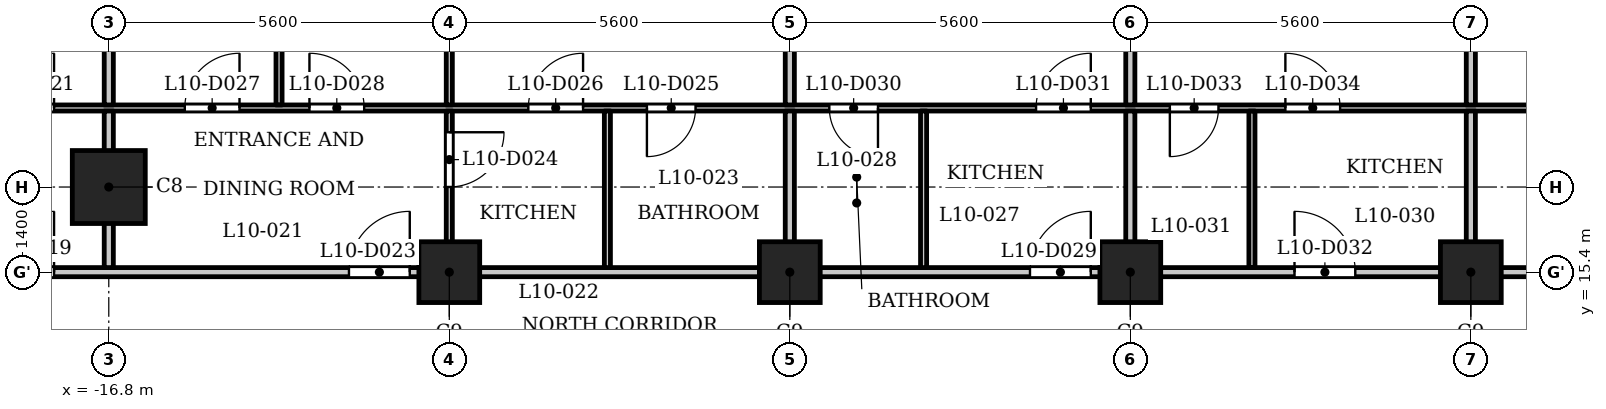
"""IFC4 building model, lengths in metres.
Left out: names, types, materials, properties, quantities, classifications, styles, units other than length and angle.
Written with IfcOpenShell. Run it as: python <this file> out.ifc"""

import sys

from ifc_helpers import new_model, si_unit, direction, frame, frame_2d, origin, origin_2d, place, context, subcontext, project, spatial, rectangle, extrude, element, fill, save


model = new_model("IFC4")
c1 = context("Model", 3, precision=1e-05, world=origin(), true_north=direction((0.0, 1.0)))
c2 = subcontext(c1, "Body", "Model", "MODEL_VIEW")
j1 = project(units=[si_unit("LENGTHUNIT", "METRE"), si_unit("PLANEANGLEUNIT", "RADIAN")], contexts=[c1])
p1 = place(None, origin())
s1 = spatial("IfcSite", under=j1, at=p1, CompositionType="ELEMENT")
p2 = place(p1, origin())
s2 = spatial("IfcBuilding", under=s1, at=p2, CompositionType="ELEMENT")
p3 = place(p2, frame((0.0, 0.0, 44.5)))
s3 = spatial("IfcBuildingStorey", under=s2, at=p3, CompositionType="ELEMENT", Elevation=44.5)
p4 = place(p3, frame((-16.8, 16.8, 0.0), z_axis=(0.0, 0.0, 1.0), x_axis=(1.0, 0.0, 0.0)))
e1 = element("IfcColumn", 1, at=p4, inside=s3, PredefinedType="COLUMN", context=c2, shape_type="SweptSolid", body=[
    extrude(rectangle(XDim=1.2, YDim=1.2, at=origin_2d()), origin(), (0.0, 0.0, 1.0), 3.5),
])
for number, where, z_axis, x_axis in (
    (2, (-11.2, 15.4, 0.0), (0.0, 0.0, 1.0), (1.0, 0.0, 0.0)),
    (3, (-5.6, 15.4, 0.0), (0.0, 0.0, 1.0), (1.0, 0.0, 0.0)),
    (4, (0.0, 15.4, 0.0), (0.0, 0.0, 1.0), (1.0, 0.0, 0.0)),
    (5, (5.6, 15.4, 0.0), (0.0, 0.0, 1.0), (1.0, 0.0, 0.0)),
):
    element("IfcColumn", number, at=place(p3, frame(where, z_axis=z_axis, x_axis=x_axis)), inside=s3, PredefinedType="COLUMN", context=c2, shape_type="SweptSolid", body=[
        extrude(rectangle(XDim=1.0, YDim=1.0, at=origin_2d()), origin(), (0.0, 0.0, 1.0), 3.5),
    ])
p5 = place(p3, frame((-27.484, 15.4, 0.0), z_axis=(0.0, 0.0, 1.0), x_axis=(1.0, 0.0, 0.0)))
e6 = element("IfcWall", 6, at=p5, inside=s3, PredefinedType="PARTITIONING", context=c2, shape_type="SweptSolid", body=[
    extrude(rectangle(XDim=54.968, YDim=0.15, at=frame_2d((27.484, 0.0))), origin(), (0.0, 0.0, 1.0), 3.2),
])
p6 = place(p5, frame((8.784, 0.0, 0.0)))
e7 = element("IfcOpeningElement", 7, at=p6, cuts=e6, PredefinedType="OPENING", context=c2, shape_type="SweptSolid", body=[
    extrude(rectangle(XDim=1.0, YDim=2.1, at=frame_2d((0.5, 1.05))), frame((0.0, 0.085, 0.0), z_axis=(0.0, -1.0, 0.0), x_axis=(1.0, 0.0, 0.0)), (0.0, 0.0, 1.0), 0.17),
])
p7 = place(p5, frame((14.634, 0.0, 0.0)))
e8 = element("IfcOpeningElement", 8, at=p7, cuts=e6, PredefinedType="OPENING", context=c2, shape_type="SweptSolid", body=[
    extrude(rectangle(XDim=1.0, YDim=2.1, at=frame_2d((0.5, 1.05))), frame((0.0, 0.085, 0.0), z_axis=(0.0, -1.0, 0.0), x_axis=(1.0, 0.0, 0.0)), (0.0, 0.0, 1.0), 0.17),
])
p8 = place(p5, frame((25.834, 0.0, 0.0)))
e9 = element("IfcOpeningElement", 9, at=p8, cuts=e6, PredefinedType="OPENING", context=c2, shape_type="SweptSolid", body=[
    extrude(rectangle(XDim=1.0, YDim=2.1, at=frame_2d((0.5, 1.05))), frame((0.0, 0.085, 0.0), z_axis=(0.0, -1.0, 0.0), x_axis=(1.0, 0.0, 0.0)), (0.0, 0.0, 1.0), 0.17),
])
p9 = place(p5, frame((30.184, 0.0, 0.0)))
e10 = element("IfcOpeningElement", 10, at=p9, cuts=e6, PredefinedType="OPENING", context=c2, shape_type="SweptSolid", body=[
    extrude(rectangle(XDim=1.0, YDim=2.1, at=frame_2d((0.5, 1.05))), frame((0.0, 0.085, 0.0), z_axis=(0.0, -1.0, 0.0), x_axis=(1.0, 0.0, 0.0)), (0.0, 0.0, 1.0), 0.17),
])
p10 = place(p5, frame((37.034, 0.0, 0.0)))
e11 = element("IfcOpeningElement", 11, at=p10, cuts=e6, PredefinedType="OPENING", context=c2, shape_type="SweptSolid", body=[
    extrude(rectangle(XDim=1.0, YDim=2.1, at=frame_2d((0.5, 1.05))), frame((0.0, 0.085, 0.0), z_axis=(0.0, -1.0, 0.0), x_axis=(1.0, 0.0, 0.0)), (0.0, 0.0, 1.0), 0.17),
])
p11 = place(p5, frame((48.234, 0.0, 0.0)))
e12 = element("IfcOpeningElement", 12, at=p11, cuts=e6, PredefinedType="OPENING", context=c2, shape_type="SweptSolid", body=[
    extrude(rectangle(XDim=1.0, YDim=2.1, at=frame_2d((0.5, 1.05))), frame((0.0, 0.085, 0.0), z_axis=(0.0, -1.0, 0.0), x_axis=(1.0, 0.0, 0.0)), (0.0, 0.0, 1.0), 0.17),
])
p12 = place(p3, frame((-26.44, 18.1, 0.0), z_axis=(0.0, 0.0, 1.0), x_axis=(1.0, 0.0, 0.0)))
e13 = element("IfcWall", 13, at=p12, inside=s3, PredefinedType="PARTITIONING", context=c2, shape_type="SweptSolid", body=[
    extrude(rectangle(XDim=52.63, YDim=0.1, at=frame_2d((26.315, 0.0))), origin(), (0.0, 0.0, 1.0), 3.2),
])
p13 = place(p12, frame((2.626, 0.0, 0.0)))
e14 = element("IfcOpeningElement", 14, at=p13, cuts=e13, PredefinedType="OPENING", context=c2, shape_type="SweptSolid", body=[
    extrude(rectangle(XDim=0.8, YDim=2.1, at=frame_2d((0.4, 1.05))), frame((0.0, 0.06, 0.0), z_axis=(0.0, -1.0, 0.0), x_axis=(1.0, 0.0, 0.0)), (0.0, 0.0, 1.0), 0.12),
])
p14 = place(p12, frame((7.84, 0.0, 0.0)))
e15 = element("IfcOpeningElement", 15, at=p14, cuts=e13, PredefinedType="OPENING", context=c2, shape_type="SweptSolid", body=[
    extrude(rectangle(XDim=0.9, YDim=2.1, at=frame_2d((0.45, 1.05))), frame((0.0, 0.06, 0.0), z_axis=(0.0, -1.0, 0.0), x_axis=(1.0, 0.0, 0.0)), (0.0, 0.0, 1.0), 0.12),
])
p15 = place(p12, frame((18.49, 0.0, 0.0)))
e16 = element("IfcOpeningElement", 16, at=p15, cuts=e13, PredefinedType="OPENING", context=c2, shape_type="SweptSolid", body=[
    extrude(rectangle(XDim=0.8, YDim=2.1, at=frame_2d((0.4, 1.05))), frame((0.0, 0.06, 0.0), z_axis=(0.0, -1.0, 0.0), x_axis=(1.0, 0.0, 0.0)), (0.0, 0.0, 1.0), 0.12),
])
p16 = place(p12, frame((16.54, 0.0, 0.0)))
e17 = element("IfcOpeningElement", 17, at=p16, cuts=e13, PredefinedType="OPENING", context=c2, shape_type="SweptSolid", body=[
    extrude(rectangle(XDim=0.9, YDim=2.1, at=frame_2d((0.45, 1.05))), frame((0.0, 0.06, 0.0), z_axis=(0.0, -1.0, 0.0), x_axis=(1.0, 0.0, 0.0)), (0.0, 0.0, 1.0), 0.12),
])
p17 = place(p12, frame((10.89, 0.0, 0.0)))
e18 = element("IfcOpeningElement", 18, at=p17, cuts=e13, PredefinedType="OPENING", context=c2, shape_type="SweptSolid", body=[
    extrude(rectangle(XDim=0.9, YDim=2.1, at=frame_2d((0.45, 1.05))), frame((0.0, 0.06, 0.0), z_axis=(0.0, -1.0, 0.0), x_axis=(1.0, 0.0, 0.0)), (0.0, 0.0, 1.0), 0.12),
])
p18 = place(p12, frame((12.94, 0.0, 0.0)))
e19 = element("IfcOpeningElement", 19, at=p18, cuts=e13, PredefinedType="OPENING", context=c2, shape_type="SweptSolid", body=[
    extrude(rectangle(XDim=0.9, YDim=2.1, at=frame_2d((0.45, 1.05))), frame((0.0, 0.06, 0.0), z_axis=(0.0, -1.0, 0.0), x_axis=(1.0, 0.0, 0.0)), (0.0, 0.0, 1.0), 0.12),
])
p19 = place(p12, frame((21.49, 0.0, 0.0)))
e20 = element("IfcOpeningElement", 20, at=p19, cuts=e13, PredefinedType="OPENING", context=c2, shape_type="SweptSolid", body=[
    extrude(rectangle(XDim=0.8, YDim=2.1, at=frame_2d((0.4, 1.05))), frame((0.0, 0.06, 0.0), z_axis=(0.0, -1.0, 0.0), x_axis=(1.0, 0.0, 0.0)), (0.0, 0.0, 1.0), 0.12),
])
p20 = place(p12, frame((24.89, 0.0, 0.0)))
e21 = element("IfcOpeningElement", 21, at=p20, cuts=e13, PredefinedType="OPENING", context=c2, shape_type="SweptSolid", body=[
    extrude(rectangle(XDim=0.9, YDim=2.1, at=frame_2d((0.45, 1.05))), frame((0.0, 0.06, 0.0), z_axis=(0.0, -1.0, 0.0), x_axis=(1.0, 0.0, 0.0)), (0.0, 0.0, 1.0), 0.12),
])
p21 = place(p12, frame((27.09, 0.0, 0.0)))
e22 = element("IfcOpeningElement", 22, at=p21, cuts=e13, PredefinedType="OPENING", context=c2, shape_type="SweptSolid", body=[
    extrude(rectangle(XDim=0.8, YDim=2.1, at=frame_2d((0.4, 1.05))), frame((0.0, 0.06, 0.0), z_axis=(0.0, -1.0, 0.0), x_axis=(1.0, 0.0, 0.0)), (0.0, 0.0, 1.0), 0.12),
])
p22 = place(p12, frame((28.99, 0.0, 0.0)))
e23 = element("IfcOpeningElement", 23, at=p22, cuts=e13, PredefinedType="OPENING", context=c2, shape_type="SweptSolid", body=[
    extrude(rectangle(XDim=0.9, YDim=2.1, at=frame_2d((0.45, 1.05))), frame((0.0, 0.06, 0.0), z_axis=(0.0, -1.0, 0.0), x_axis=(1.0, 0.0, 0.0)), (0.0, 0.0, 1.0), 0.12),
])
p23 = place(p12, frame((41.69, 0.0, 0.0)))
e24 = element("IfcOpeningElement", 24, at=p23, cuts=e13, PredefinedType="OPENING", context=c2, shape_type="SweptSolid", body=[
    extrude(rectangle(XDim=0.8, YDim=2.1, at=frame_2d((0.4, 1.05))), frame((0.0, 0.06, 0.0), z_axis=(0.0, -1.0, 0.0), x_axis=(1.0, 0.0, 0.0)), (0.0, 0.0, 1.0), 0.12),
])
p24 = place(p12, frame((38.99, 0.0, 0.0)))
e25 = element("IfcOpeningElement", 25, at=p24, cuts=e13, PredefinedType="OPENING", context=c2, shape_type="SweptSolid", body=[
    extrude(rectangle(XDim=0.9, YDim=2.1, at=frame_2d((0.45, 1.05))), frame((0.0, 0.06, 0.0), z_axis=(0.0, -1.0, 0.0), x_axis=(1.0, 0.0, 0.0)), (0.0, 0.0, 1.0), 0.12),
])
p25 = place(p12, frame((33.29, 0.0, 0.0)))
e26 = element("IfcOpeningElement", 26, at=p25, cuts=e13, PredefinedType="OPENING", context=c2, shape_type="SweptSolid", body=[
    extrude(rectangle(XDim=0.9, YDim=2.1, at=frame_2d((0.45, 1.05))), frame((0.0, 0.06, 0.0), z_axis=(0.0, -1.0, 0.0), x_axis=(1.0, 0.0, 0.0)), (0.0, 0.0, 1.0), 0.12),
])
p26 = place(p12, frame((35.34, 0.0, 0.0)))
e27 = element("IfcOpeningElement", 27, at=p26, cuts=e13, PredefinedType="OPENING", context=c2, shape_type="SweptSolid", body=[
    extrude(rectangle(XDim=0.9, YDim=2.1, at=frame_2d((0.45, 1.05))), frame((0.0, 0.06, 0.0), z_axis=(0.0, -1.0, 0.0), x_axis=(1.0, 0.0, 0.0)), (0.0, 0.0, 1.0), 0.12),
])
p27 = place(p12, frame((50.74, 0.0, 0.0)))
e28 = element("IfcOpeningElement", 28, at=p27, cuts=e13, PredefinedType="OPENING", context=c2, shape_type="SweptSolid", body=[
    extrude(rectangle(XDim=0.8, YDim=2.1, at=frame_2d((0.4, 1.05))), frame((0.0, 0.06, 0.0), z_axis=(0.0, -1.0, 0.0), x_axis=(1.0, 0.0, 0.0)), (0.0, 0.0, 1.0), 0.12),
])
p28 = place(p12, frame((47.29, 0.0, 0.0)))
e29 = element("IfcOpeningElement", 29, at=p28, cuts=e13, PredefinedType="OPENING", context=c2, shape_type="SweptSolid", body=[
    extrude(rectangle(XDim=0.9, YDim=2.1, at=frame_2d((0.45, 1.05))), frame((0.0, 0.06, 0.0), z_axis=(0.0, -1.0, 0.0), x_axis=(1.0, 0.0, 0.0)), (0.0, 0.0, 1.0), 0.12),
])
p29 = place(p3, frame((-16.8, 15.475, 0.0), z_axis=(0.0, 0.0, 1.0), x_axis=(0.0, 1.0, 0.0)))
e30 = element("IfcWall", 30, at=p29, inside=s3, PredefinedType="PARTITIONING", context=c2, shape_type="SweptSolid", body=[
    extrude(rectangle(XDim=2.575, YDim=0.15, at=frame_2d((1.288, 0.0))), origin(), (0.0, 0.0, 1.0), 3.2),
])
p30 = place(p3, frame((-16.8, 18.15, 0.0), z_axis=(0.0, 0.0, 1.0), x_axis=(0.0, 1.0, 0.0)))
e31 = element("IfcWall", 31, at=p30, inside=s3, PredefinedType="PARTITIONING", context=c2, shape_type="SweptSolid", body=[
    extrude(rectangle(XDim=4.98, YDim=0.15, at=frame_2d((2.49, 0.0))), origin(), (0.0, 0.0, 1.0), 3.2),
])
p31 = place(p3, frame((-14.0, 18.15, 0.0), z_axis=(0.0, 0.0, 1.0), x_axis=(0.0, 1.0, 0.0)))
e32 = element("IfcWall", 32, at=p31, inside=s3, PredefinedType="PARTITIONING", context=c2, shape_type="SweptSolid", body=[
    extrude(rectangle(XDim=3.93, YDim=0.1, at=frame_2d((1.965, 0.0))), origin(), (0.0, 0.0, 1.0), 3.2),
])
p32 = place(p3, frame((-11.2, 15.475, 0.0), z_axis=(0.0, 0.0, 1.0), x_axis=(0.0, 1.0, 0.0)))
e33 = element("IfcWall", 33, at=p32, inside=s3, PredefinedType="PARTITIONING", context=c2, shape_type="SweptSolid", body=[
    extrude(rectangle(XDim=2.575, YDim=0.1, at=frame_2d((1.288, 0.0))), origin(), (0.0, 0.0, 1.0), 3.2),
])
p33 = place(p32, frame((1.326, 0.0, 0.0)))
e34 = element("IfcOpeningElement", 34, at=p33, cuts=e33, PredefinedType="OPENING", context=c2, shape_type="SweptSolid", body=[
    extrude(rectangle(XDim=0.9, YDim=2.1, at=frame_2d((0.45, 1.05))), frame((0.0, 0.06, 0.0), z_axis=(0.0, -1.0, 0.0), x_axis=(1.0, 0.0, 0.0)), (0.0, 0.0, 1.0), 0.12),
])
p34 = place(p3, frame((-11.2, 18.15, 0.0), z_axis=(0.0, 0.0, 1.0), x_axis=(0.0, 1.0, 0.0)))
e35 = element("IfcWall", 35, at=p34, inside=s3, PredefinedType="PARTITIONING", context=c2, shape_type="SweptSolid", body=[
    extrude(rectangle(XDim=4.98, YDim=0.1, at=frame_2d((2.49, 0.0))), origin(), (0.0, 0.0, 1.0), 3.2),
])
p35 = place(p3, frame((-8.6, 15.475, 0.0), z_axis=(0.0, 0.0, 1.0), x_axis=(0.0, 1.0, 0.0)))
e36 = element("IfcWall", 36, at=p35, inside=s3, PredefinedType="PARTITIONING", context=c2, shape_type="SweptSolid", body=[
    extrude(rectangle(XDim=2.575, YDim=0.1, at=frame_2d((1.288, 0.0))), origin(), (0.0, 0.0, 1.0), 3.2),
])
p36 = place(p3, frame((-5.6, 15.475, 0.0), z_axis=(0.0, 0.0, 1.0), x_axis=(0.0, 1.0, 0.0)))
e37 = element("IfcWall", 37, at=p36, inside=s3, PredefinedType="PARTITIONING", context=c2, shape_type="SweptSolid", body=[
    extrude(rectangle(XDim=2.575, YDim=0.15, at=frame_2d((1.288, 0.0))), origin(), (0.0, 0.0, 1.0), 3.2),
])
p37 = place(p3, frame((-5.6, 18.15, 0.0), z_axis=(0.0, 0.0, 1.0), x_axis=(0.0, 1.0, 0.0)))
e38 = element("IfcWall", 38, at=p37, inside=s3, PredefinedType="PARTITIONING", context=c2, shape_type="SweptSolid", body=[
    extrude(rectangle(XDim=4.98, YDim=0.15, at=frame_2d((2.49, 0.0))), origin(), (0.0, 0.0, 1.0), 3.2),
])
p38 = place(p3, frame((-3.4, 15.475, 0.0), z_axis=(0.0, 0.0, 1.0), x_axis=(0.0, 1.0, 0.0)))
e39 = element("IfcWall", 39, at=p38, inside=s3, PredefinedType="PARTITIONING", context=c2, shape_type="SweptSolid", body=[
    extrude(rectangle(XDim=2.575, YDim=0.1, at=frame_2d((1.288, 0.0))), origin(), (0.0, 0.0, 1.0), 3.2),
])
p39 = place(p3, frame((0.0, 15.475, 0.0), z_axis=(0.0, 0.0, 1.0), x_axis=(0.0, 1.0, 0.0)))
e40 = element("IfcWall", 40, at=p39, inside=s3, PredefinedType="PARTITIONING", context=c2, shape_type="SweptSolid", body=[
    extrude(rectangle(XDim=2.575, YDim=0.15, at=frame_2d((1.288, 0.0))), origin(), (0.0, 0.0, 1.0), 3.2),
])
p40 = place(p3, frame((0.0, 18.15, 0.0), z_axis=(0.0, 0.0, 1.0), x_axis=(0.0, 1.0, 0.0)))
e41 = element("IfcWall", 41, at=p40, inside=s3, PredefinedType="PARTITIONING", context=c2, shape_type="SweptSolid", body=[
    extrude(rectangle(XDim=4.98, YDim=0.15, at=frame_2d((2.49, 0.0))), origin(), (0.0, 0.0, 1.0), 3.2),
])
p41 = place(p3, frame((2.0, 15.475, 0.0), z_axis=(0.0, 0.0, 1.0), x_axis=(0.0, 1.0, 0.0)))
e42 = element("IfcWall", 42, at=p41, inside=s3, PredefinedType="PARTITIONING", context=c2, shape_type="SweptSolid", body=[
    extrude(rectangle(XDim=2.575, YDim=0.1, at=frame_2d((1.288, 0.0))), origin(), (0.0, 0.0, 1.0), 3.2),
])
p42 = place(p3, frame((5.6, 15.475, 0.0), z_axis=(0.0, 0.0, 1.0), x_axis=(0.0, 1.0, 0.0)))
e43 = element("IfcWall", 43, at=p42, inside=s3, PredefinedType="PARTITIONING", context=c2, shape_type="SweptSolid", body=[
    extrude(rectangle(XDim=2.575, YDim=0.15, at=frame_2d((1.288, 0.0))), origin(), (0.0, 0.0, 1.0), 3.2),
])
p43 = place(p3, frame((5.6, 18.15, 0.0), z_axis=(0.0, 0.0, 1.0), x_axis=(0.0, 1.0, 0.0)))
e44 = element("IfcWall", 44, at=p43, inside=s3, PredefinedType="PARTITIONING", context=c2, shape_type="SweptSolid", body=[
    extrude(rectangle(XDim=4.98, YDim=0.15, at=frame_2d((2.49, 0.0))), origin(), (0.0, 0.0, 1.0), 3.2),
])
p44 = place(p6, origin())
e45 = element("IfcDoor", 45, at=p44, inside=s3, OperationType="SINGLE_SWING_LEFT", PredefinedType="DOOR", context=c2, shape_type="SweptSolid", body=[
    extrude(rectangle(XDim=1.0, YDim=2.1, at=frame_2d((0.5, 1.05))), frame((0.0, 0.025, 0.0), z_axis=(0.0, -1.0, 0.0), x_axis=(1.0, 0.0, 0.0)), (0.0, 0.0, 1.0), 0.05),
])
fill(e7, e45)
p45 = place(p14, origin())
e46 = element("IfcDoor", 46, at=p45, inside=s3, OperationType="SINGLE_SWING_LEFT", PredefinedType="DOOR", context=c2, shape_type="SweptSolid", body=[
    extrude(rectangle(XDim=0.9, YDim=2.1, at=frame_2d((0.45, 1.05))), frame((0.0, 0.025, 0.0), z_axis=(0.0, -1.0, 0.0), x_axis=(1.0, 0.0, 0.0)), (0.0, 0.0, 1.0), 0.05),
])
fill(e15, e46)
p46 = place(p7, origin())
e47 = element("IfcDoor", 47, at=p46, inside=s3, OperationType="SINGLE_SWING_LEFT", PredefinedType="DOOR", context=c2, shape_type="SweptSolid", body=[
    extrude(rectangle(XDim=1.0, YDim=2.1, at=frame_2d((0.5, 1.05))), frame((0.0, 0.025, 0.0), z_axis=(0.0, -1.0, 0.0), x_axis=(1.0, 0.0, 0.0)), (0.0, 0.0, 1.0), 0.05),
])
fill(e8, e47)
p47 = place(p33, origin())
e48 = element("IfcDoor", 48, at=p47, inside=s3, OperationType="SINGLE_SWING_RIGHT", PredefinedType="DOOR", context=c2, shape_type="SweptSolid", body=[
    extrude(rectangle(XDim=0.9, YDim=2.1, at=frame_2d((0.45, 1.05))), frame((0.0, 0.025, 0.0), z_axis=(0.0, -1.0, 0.0), x_axis=(1.0, 0.0, 0.0)), (0.0, 0.0, 1.0), 0.05),
])
fill(e34, e48)
p48 = place(p15, origin())
e49 = element("IfcDoor", 49, at=p48, inside=s3, OperationType="SINGLE_SWING_LEFT", PredefinedType="DOOR", context=c2, shape_type="SweptSolid", body=[
    extrude(rectangle(XDim=0.8, YDim=2.1, at=frame_2d((0.4, 1.05))), frame((0.0, 0.025, 0.0), z_axis=(0.0, -1.0, 0.0), x_axis=(1.0, 0.0, 0.0)), (0.0, 0.0, 1.0), 0.05),
])
fill(e16, e49)
p49 = place(p16, origin())
e50 = element("IfcDoor", 50, at=p49, inside=s3, OperationType="SINGLE_SWING_LEFT", PredefinedType="DOOR", context=c2, shape_type="SweptSolid", body=[
    extrude(rectangle(XDim=0.9, YDim=2.1, at=frame_2d((0.45, 1.05))), frame((0.0, 0.025, 0.0), z_axis=(0.0, -1.0, 0.0), x_axis=(1.0, 0.0, 0.0)), (0.0, 0.0, 1.0), 0.05),
])
fill(e17, e50)
p50 = place(p17, origin())
e51 = element("IfcDoor", 51, at=p50, inside=s3, OperationType="SINGLE_SWING_LEFT", PredefinedType="DOOR", context=c2, shape_type="SweptSolid", body=[
    extrude(rectangle(XDim=0.9, YDim=2.1, at=frame_2d((0.45, 1.05))), frame((0.0, 0.025, 0.0), z_axis=(0.0, -1.0, 0.0), x_axis=(1.0, 0.0, 0.0)), (0.0, 0.0, 1.0), 0.05),
])
fill(e18, e51)
p51 = place(p18, origin())
e52 = element("IfcDoor", 52, at=p51, inside=s3, OperationType="SINGLE_SWING_RIGHT", PredefinedType="DOOR", context=c2, shape_type="SweptSolid", body=[
    extrude(rectangle(XDim=0.9, YDim=2.1, at=frame_2d((0.45, 1.05))), frame((0.0, 0.025, 0.0), z_axis=(0.0, -1.0, 0.0), x_axis=(1.0, 0.0, 0.0)), (0.0, 0.0, 1.0), 0.05),
])
fill(e19, e52)
p52 = place(p8, origin())
e53 = element("IfcDoor", 53, at=p52, inside=s3, OperationType="SINGLE_SWING_LEFT", PredefinedType="DOOR", context=c2, shape_type="SweptSolid", body=[
    extrude(rectangle(XDim=1.0, YDim=2.1, at=frame_2d((0.5, 1.05))), frame((0.0, 0.025, 0.0), z_axis=(0.0, -1.0, 0.0), x_axis=(1.0, 0.0, 0.0)), (0.0, 0.0, 1.0), 0.05),
])
fill(e9, e53)
p53 = place(p19, origin())
e54 = element("IfcDoor", 54, at=p53, inside=s3, OperationType="SINGLE_SWING_RIGHT", PredefinedType="DOOR", context=c2, shape_type="SweptSolid", body=[
    extrude(rectangle(XDim=0.8, YDim=2.1, at=frame_2d((0.4, 1.05))), frame((0.0, 0.025, 0.0), z_axis=(0.0, -1.0, 0.0), x_axis=(1.0, 0.0, 0.0)), (0.0, 0.0, 1.0), 0.05),
])
fill(e20, e54)
p54 = place(p20, origin())
e55 = element("IfcDoor", 55, at=p54, inside=s3, OperationType="SINGLE_SWING_LEFT", PredefinedType="DOOR", context=c2, shape_type="SweptSolid", body=[
    extrude(rectangle(XDim=0.9, YDim=2.1, at=frame_2d((0.45, 1.05))), frame((0.0, 0.025, 0.0), z_axis=(0.0, -1.0, 0.0), x_axis=(1.0, 0.0, 0.0)), (0.0, 0.0, 1.0), 0.05),
])
fill(e21, e55)
p55 = place(p9, origin())
e56 = element("IfcDoor", 56, at=p55, inside=s3, OperationType="SINGLE_SWING_RIGHT", PredefinedType="DOOR", context=c2, shape_type="SweptSolid", body=[
    extrude(rectangle(XDim=1.0, YDim=2.1, at=frame_2d((0.5, 1.05))), frame((0.0, 0.025, 0.0), z_axis=(0.0, -1.0, 0.0), x_axis=(1.0, 0.0, 0.0)), (0.0, 0.0, 1.0), 0.05),
])
fill(e10, e56)
p56 = place(p21, origin())
e57 = element("IfcDoor", 57, at=p56, inside=s3, OperationType="SINGLE_SWING_LEFT", PredefinedType="DOOR", context=c2, shape_type="SweptSolid", body=[
    extrude(rectangle(XDim=0.8, YDim=2.1, at=frame_2d((0.4, 1.05))), frame((0.0, 0.025, 0.0), z_axis=(0.0, -1.0, 0.0), x_axis=(1.0, 0.0, 0.0)), (0.0, 0.0, 1.0), 0.05),
])
fill(e22, e57)
p57 = place(p22, origin())
e58 = element("IfcDoor", 58, at=p57, inside=s3, OperationType="SINGLE_SWING_RIGHT", PredefinedType="DOOR", context=c2, shape_type="SweptSolid", body=[
    extrude(rectangle(XDim=0.9, YDim=2.1, at=frame_2d((0.45, 1.05))), frame((0.0, 0.025, 0.0), z_axis=(0.0, -1.0, 0.0), x_axis=(1.0, 0.0, 0.0)), (0.0, 0.0, 1.0), 0.05),
])
fill(e23, e58)
save(model, sys.argv[1])
